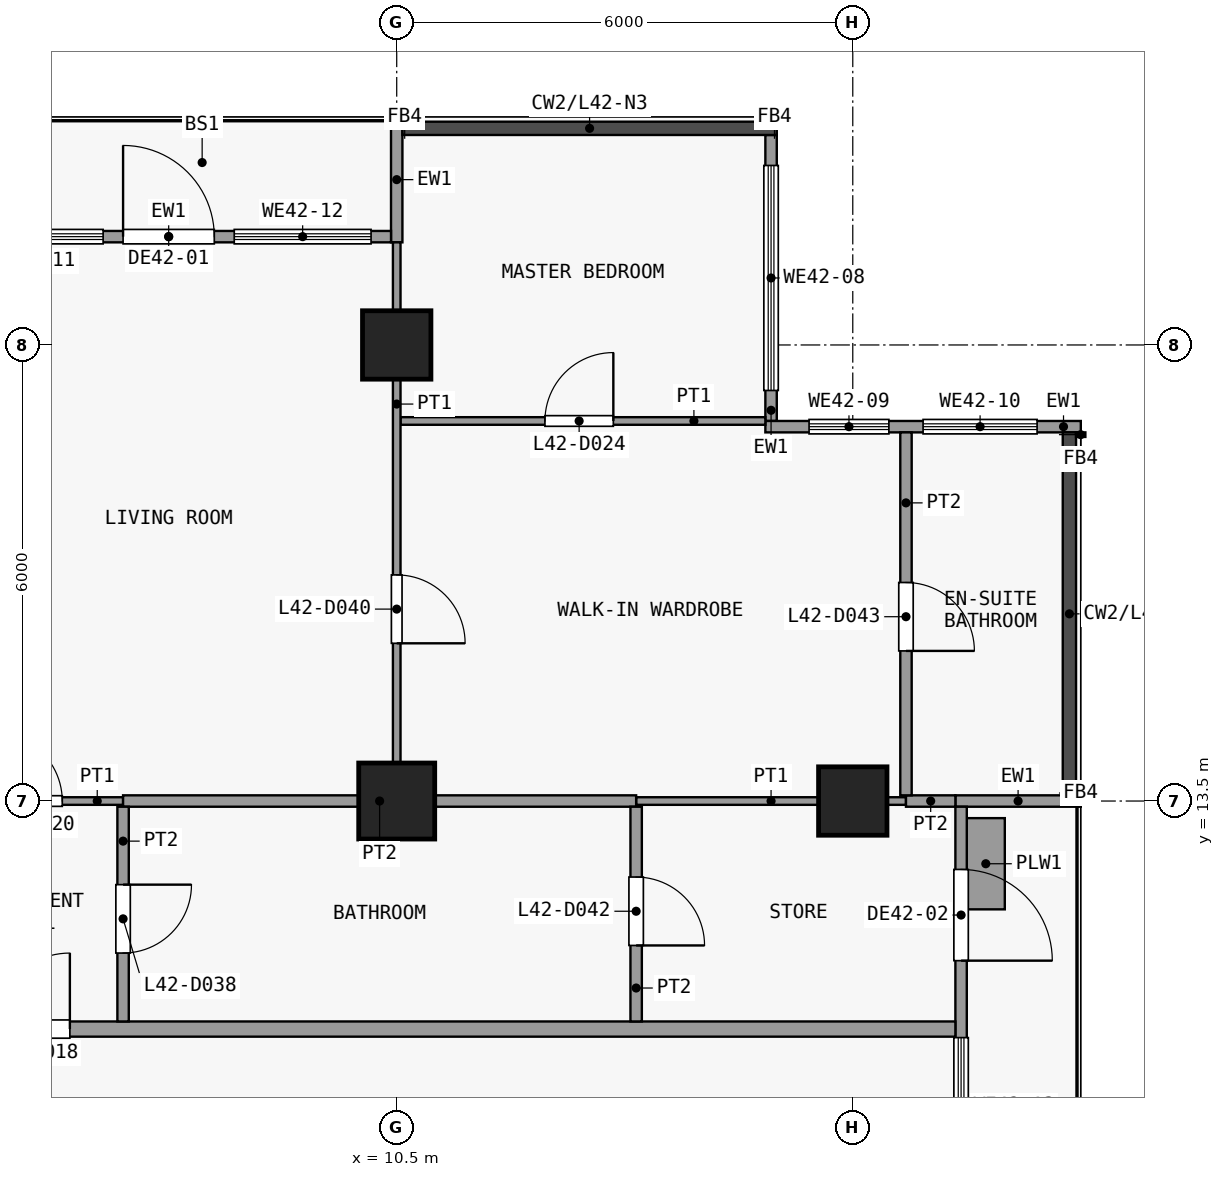
"""IFC4 building model, lengths in metres.
Left out: names, types, materials, properties, quantities, classifications, styles, units other than length and angle.
Written with IfcOpenShell. Run it as: python <this file> out.ifc"""

import sys

from ifc_helpers import new_model, si_unit, direction, frame, frame_2d, origin, origin_2d, place, context, subcontext, project, spatial, rectangle, extrude, element, fill, save


model = new_model("IFC4")
c1 = context("Model", 3, precision=1e-05, world=origin(), true_north=direction((0.0, 1.0)))
c2 = subcontext(c1, "Body", "Model", "MODEL_VIEW")
j1 = project(units=[si_unit("LENGTHUNIT", "METRE"), si_unit("PLANEANGLEUNIT", "RADIAN")], contexts=[c1])
p1 = place(None, origin())
s1 = spatial("IfcSite", under=j1, at=p1, CompositionType="ELEMENT")
p2 = place(p1, origin())
s2 = spatial("IfcBuilding", under=s1, at=p2, CompositionType="ELEMENT")
p3 = place(p2, frame((0.0, 0.0, 170.9)))
s3 = spatial("IfcBuildingStorey", under=s2, at=p3, CompositionType="ELEMENT", Elevation=170.9)
p4 = place(p3, frame((10.5, 13.5, 0.0), z_axis=(0.0, 0.0, 1.0), x_axis=(1.0, 0.0, 0.0)))
e1 = element("IfcColumn", 1, at=p4, inside=s3, PredefinedType="COLUMN", context=c2, shape_type="SweptSolid", body=[
    extrude(rectangle(XDim=1.0, YDim=1.0, at=origin_2d()), origin(), (0.0, 0.0, 1.0), 3.6),
])
for number, where, z_axis, x_axis in (
    (2, (10.5, 19.5, 0.0), (0.0, 0.0, 1.0), (1.0, 0.0, 0.0)),
    (3, (16.5, 13.5, 0.0), (0.0, 0.0, 1.0), (1.0, 0.0, 0.0)),
):
    element("IfcColumn", number, at=place(p3, frame(where, z_axis=z_axis, x_axis=x_axis)), inside=s3, PredefinedType="COLUMN", context=c2, shape_type="SweptSolid", body=[
        extrude(rectangle(XDim=0.9, YDim=0.9, at=origin_2d()), origin(), (0.0, 0.0, 1.0), 3.6),
    ])
p5 = place(p3, frame((15.425, 22.262, 0.0), z_axis=(0.0, 0.0, 1.0), x_axis=(0.0, -1.0, 0.0)))
e4 = element("IfcWall", 4, at=p5, inside=s3, PredefinedType="SOLIDWALL", context=c2, shape_type="SweptSolid", body=[
    extrude(rectangle(XDim=3.762, YDim=0.15, at=frame_2d((1.881, 0.0))), origin(), (0.0, 0.0, 1.0), 3.3),
])
p6 = place(p5, frame((0.401, 0.0, 0.9)))
e5 = element("IfcOpeningElement", 5, at=p6, cuts=e4, PredefinedType="OPENING", context=c2, shape_type="SweptSolid", body=[
    extrude(rectangle(XDim=2.96, YDim=2.4, at=frame_2d((1.48, 1.2))), frame((0.0, 0.085, 0.0), z_axis=(0.0, -1.0, 0.0), x_axis=(1.0, 0.0, 0.0)), (0.0, 0.0, 1.0), 0.17),
])
p7 = place(p3, frame((15.35, 18.425, 0.0), z_axis=(0.0, 0.0, 1.0), x_axis=(1.0, 0.0, 0.0)))
e6 = element("IfcWall", 6, at=p7, inside=s3, PredefinedType="SOLIDWALL", context=c2, shape_type="SweptSolid", body=[
    extrude(rectangle(XDim=4.15, YDim=0.15, at=frame_2d((2.075, 0.0))), origin(), (0.0, 0.0, 1.0), 3.3),
])
p8 = place(p7, frame((0.575, 0.0, 0.9)))
e7 = element("IfcOpeningElement", 7, at=p8, cuts=e6, PredefinedType="OPENING", context=c2, shape_type="SweptSolid", body=[
    extrude(rectangle(XDim=1.05, YDim=2.4, at=frame_2d((0.525, 1.2))), frame((0.0, 0.085, 0.0), z_axis=(0.0, -1.0, 0.0), x_axis=(1.0, 0.0, 0.0)), (0.0, 0.0, 1.0), 0.17),
])
p9 = place(p7, frame((2.075, 0.0, 0.9)))
e8 = element("IfcOpeningElement", 8, at=p9, cuts=e6, PredefinedType="OPENING", context=c2, shape_type="SweptSolid", body=[
    extrude(rectangle(XDim=1.5, YDim=2.4, at=frame_2d((0.75, 1.2))), frame((0.0, 0.085, 0.0), z_axis=(0.0, -1.0, 0.0), x_axis=(1.0, 0.0, 0.0)), (0.0, 0.0, 1.0), 0.17),
])
p10 = place(p3, frame((10.5, 20.85, 0.0), z_axis=(0.0, 0.0, 1.0), x_axis=(0.0, 1.0, 0.0)))
e9 = element("IfcWall", 9, at=p10, inside=s3, PredefinedType="SOLIDWALL", context=c2, shape_type="SweptSolid", body=[
    extrude(rectangle(XDim=1.65, YDim=0.15, at=frame_2d((0.825, 0.0))), origin(), (0.0, 0.0, 1.0), 3.3),
])
p11 = place(p3, frame((4.575, 20.925, 0.0), z_axis=(0.0, 0.0, 1.0), x_axis=(1.0, 0.0, 0.0)))
e10 = element("IfcWall", 10, at=p11, inside=s3, PredefinedType="SOLIDWALL", context=c2, shape_type="SweptSolid", body=[
    extrude(rectangle(XDim=5.85, YDim=0.15, at=frame_2d((2.925, 0.0))), origin(), (0.0, 0.0, 1.0), 3.3),
])
p12 = place(p11, frame((2.325, 0.0, 0.0)))
e11 = element("IfcOpeningElement", 11, at=p12, cuts=e10, PredefinedType="OPENING", context=c2, shape_type="SweptSolid", body=[
    extrude(rectangle(XDim=1.2, YDim=2.4, at=frame_2d((0.6, 1.2))), frame((0.0, 0.085, 0.0), z_axis=(0.0, -1.0, 0.0), x_axis=(1.0, 0.0, 0.0)), (0.0, 0.0, 1.0), 0.17),
])
p13 = place(p11, frame((0.262, 0.0, 0.9)))
e12 = element("IfcOpeningElement", 12, at=p13, cuts=e10, PredefinedType="OPENING", context=c2, shape_type="SweptSolid", body=[
    extrude(rectangle(XDim=1.8, YDim=2.1, at=frame_2d((0.9, 1.05))), frame((0.0, 0.085, 0.0), z_axis=(0.0, -1.0, 0.0), x_axis=(1.0, 0.0, 0.0)), (0.0, 0.0, 1.0), 0.17),
])
p14 = place(p11, frame((3.788, 0.0, 0.9)))
e13 = element("IfcOpeningElement", 13, at=p14, cuts=e10, PredefinedType="OPENING", context=c2, shape_type="SweptSolid", body=[
    extrude(rectangle(XDim=1.8, YDim=2.1, at=frame_2d((0.9, 1.05))), frame((0.0, 0.085, 0.0), z_axis=(0.0, -1.0, 0.0), x_axis=(1.0, 0.0, 0.0)), (0.0, 0.0, 1.0), 0.17),
])
p15 = place(p3, frame((17.85, 13.5, 0.0), z_axis=(0.0, 0.0, 1.0), x_axis=(1.0, 0.0, 0.0)))
e14 = element("IfcWall", 14, at=p15, inside=s3, PredefinedType="SOLIDWALL", context=c2, shape_type="SweptSolid", body=[
    extrude(rectangle(XDim=1.65, YDim=0.15, at=frame_2d((0.825, 0.0))), origin(), (0.0, 0.0, 1.0), 3.3),
])
p16 = place(p3, frame((17.925, 13.425, 0.0), z_axis=(0.0, 0.0, 1.0), x_axis=(0.0, -1.0, 0.0)))
e15 = element("IfcWall", 15, at=p16, inside=s3, PredefinedType="SOLIDWALL", context=c2, shape_type="SweptSolid", body=[
    extrude(rectangle(XDim=5.85, YDim=0.15, at=frame_2d((2.925, 0.0))), origin(), (0.0, 0.0, 1.0), 3.3),
])
p17 = place(p16, frame((0.825, 0.0, 0.0)))
e16 = element("IfcOpeningElement", 16, at=p17, cuts=e15, PredefinedType="OPENING", context=c2, shape_type="SweptSolid", body=[
    extrude(rectangle(XDim=1.2, YDim=2.4, at=frame_2d((0.6, 1.2))), frame((0.0, 0.085, 0.0), z_axis=(0.0, -1.0, 0.0), x_axis=(1.0, 0.0, 0.0)), (0.0, 0.0, 1.0), 0.17),
])
p18 = place(p16, frame((3.038, 0.0, 0.9)))
e17 = element("IfcOpeningElement", 17, at=p18, cuts=e15, PredefinedType="OPENING", context=c2, shape_type="SweptSolid", body=[
    extrude(rectangle(XDim=1.8, YDim=2.1, at=frame_2d((0.9, 1.05))), frame((0.0, 0.085, 0.0), z_axis=(0.0, -1.0, 0.0), x_axis=(1.0, 0.0, 0.0)), (0.0, 0.0, 1.0), 0.17),
])
p19 = place(p3, frame((18.25, 12.075, 0.0), z_axis=(0.0, 0.0, 1.0), x_axis=(0.0, 1.0, 0.0)))
e18 = element("IfcWall", 18, at=p19, inside=s3, PredefinedType="USERDEFINED", context=c2, shape_type="SweptSolid", body=[
    extrude(rectangle(XDim=1.2, YDim=0.5, at=frame_2d((0.6, 0.0))), origin(), (0.0, 0.0, 1.0), 0.9),
])
p20 = place(p3, frame((-19.35, 10.5, 0.0), z_axis=(0.0, 0.0, 1.0), x_axis=(1.0, 0.0, 0.0)))
e19 = element("IfcWall", 19, at=p20, inside=s3, PredefinedType="PARTITIONING", context=c2, shape_type="SweptSolid", body=[
    extrude(rectangle(XDim=37.2, YDim=0.2, at=frame_2d((18.6, 0.0))), origin(), (0.0, 0.0, 1.0), 3.3),
])
p21 = place(p20, frame((10.55, 0.0, 0.0)))
e20 = element("IfcOpeningElement", 20, at=p21, cuts=e19, PredefinedType="OPENING", context=c2, shape_type="SweptSolid", body=[
    extrude(rectangle(XDim=1.0, YDim=2.1, at=frame_2d((0.5, 1.05))), frame((0.0, 0.11, 0.0), z_axis=(0.0, -1.0, 0.0), x_axis=(1.0, 0.0, 0.0)), (0.0, 0.0, 1.0), 0.22),
])
p22 = place(p20, frame((24.55, 0.0, 0.0)))
e21 = element("IfcOpeningElement", 21, at=p22, cuts=e19, PredefinedType="OPENING", context=c2, shape_type="SweptSolid", body=[
    extrude(rectangle(XDim=1.0, YDim=2.1, at=frame_2d((0.5, 1.05))), frame((0.0, 0.11, 0.0), z_axis=(0.0, -1.0, 0.0), x_axis=(1.0, 0.0, 0.0)), (0.0, 0.0, 1.0), 0.22),
])
p23 = place(p3, frame((4.5, 13.5, 0.0), z_axis=(0.0, 0.0, 1.0), x_axis=(1.0, 0.0, 0.0)))
e22 = element("IfcWall", 22, at=p23, inside=s3, PredefinedType="PARTITIONING", context=c2, shape_type="SweptSolid", body=[
    extrude(rectangle(XDim=2.4, YDim=0.1, at=frame_2d((1.2, 0.0))), origin(), (0.0, 0.0, 1.0), 3.3),
])
p24 = place(p23, frame((0.7, 0.0, 0.0)))
e23 = element("IfcOpeningElement", 23, at=p24, cuts=e22, PredefinedType="OPENING", context=c2, shape_type="SweptSolid", body=[
    extrude(rectangle(XDim=0.9, YDim=2.1, at=frame_2d((0.45, 1.05))), frame((0.0, 0.06, 0.0), z_axis=(0.0, -1.0, 0.0), x_axis=(1.0, 0.0, 0.0)), (0.0, 0.0, 1.0), 0.12),
])
p25 = place(p3, frame((13.65, 13.5, 0.0), z_axis=(0.0, 0.0, 1.0), x_axis=(1.0, 0.0, 0.0)))
e24 = element("IfcWall", 24, at=p25, inside=s3, PredefinedType="PARTITIONING", context=c2, shape_type="SweptSolid", body=[
    extrude(rectangle(XDim=3.55, YDim=0.1, at=frame_2d((1.775, 0.0))), origin(), (0.0, 0.0, 1.0), 3.3),
])
p26 = place(p3, frame((6.9, 13.5, 0.0), z_axis=(0.0, 0.0, 1.0), x_axis=(1.0, 0.0, 0.0)))
e25 = element("IfcWall", 25, at=p26, inside=s3, PredefinedType="PARTITIONING", context=c2, shape_type="SweptSolid", body=[
    extrude(rectangle(XDim=6.75, YDim=0.15, at=frame_2d((3.375, 0.0))), origin(), (0.0, 0.0, 1.0), 3.3),
])
p27 = place(p3, frame((17.2, 13.5, 0.0), z_axis=(0.0, 0.0, 1.0), x_axis=(1.0, 0.0, 0.0)))
e26 = element("IfcWall", 26, at=p27, inside=s3, PredefinedType="PARTITIONING", context=c2, shape_type="SweptSolid", body=[
    extrude(rectangle(XDim=0.65, YDim=0.15, at=frame_2d((0.325, 0.0))), origin(), (0.0, 0.0, 1.0), 3.3),
])
p28 = place(p3, frame((10.55, 18.5, 0.0), z_axis=(0.0, 0.0, 1.0), x_axis=(1.0, 0.0, 0.0)))
e27 = element("IfcWall", 27, at=p28, inside=s3, PredefinedType="PARTITIONING", context=c2, shape_type="SweptSolid", body=[
    extrude(rectangle(XDim=4.8, YDim=0.1, at=frame_2d((2.4, 0.0))), origin(), (0.0, 0.0, 1.0), 3.3),
])
p29 = place(p28, frame((1.9, 0.0, 0.0)))
e28 = element("IfcOpeningElement", 28, at=p29, cuts=e27, PredefinedType="OPENING", context=c2, shape_type="SweptSolid", body=[
    extrude(rectangle(XDim=0.9, YDim=2.1, at=frame_2d((0.45, 1.05))), frame((0.0, 0.06, 0.0), z_axis=(0.0, -1.0, 0.0), x_axis=(1.0, 0.0, 0.0)), (0.0, 0.0, 1.0), 0.12),
])
p30 = place(p3, frame((6.9, 10.6, 0.0), z_axis=(0.0, 0.0, 1.0), x_axis=(0.0, 1.0, 0.0)))
e29 = element("IfcWall", 29, at=p30, inside=s3, PredefinedType="PARTITIONING", context=c2, shape_type="SweptSolid", body=[
    extrude(rectangle(XDim=2.825, YDim=0.15, at=frame_2d((1.413, 0.0))), origin(), (0.0, 0.0, 1.0), 3.3),
])
p31 = place(p30, frame((0.9, 0.0, 0.0)))
e30 = element("IfcOpeningElement", 30, at=p31, cuts=e29, PredefinedType="OPENING", context=c2, shape_type="SweptSolid", body=[
    extrude(rectangle(XDim=0.9, YDim=2.1, at=frame_2d((0.45, 1.05))), frame((0.0, 0.085, 0.0), z_axis=(0.0, -1.0, 0.0), x_axis=(1.0, 0.0, 0.0)), (0.0, 0.0, 1.0), 0.17),
])
p32 = place(p3, frame((10.5, 13.575, 0.0), z_axis=(0.0, 0.0, 1.0), x_axis=(0.0, 1.0, 0.0)))
e31 = element("IfcWall", 31, at=p32, inside=s3, PredefinedType="PARTITIONING", context=c2, shape_type="SweptSolid", body=[
    extrude(rectangle(XDim=7.275, YDim=0.1, at=frame_2d((3.638, 0.0))), origin(), (0.0, 0.0, 1.0), 3.3),
])
p33 = place(p32, frame((2.0, 0.0, 0.0)))
e32 = element("IfcOpeningElement", 32, at=p33, cuts=e31, PredefinedType="OPENING", context=c2, shape_type="SweptSolid", body=[
    extrude(rectangle(XDim=0.9, YDim=2.1, at=frame_2d((0.45, 1.05))), frame((0.0, 0.06, 0.0), z_axis=(0.0, -1.0, 0.0), x_axis=(1.0, 0.0, 0.0)), (0.0, 0.0, 1.0), 0.12),
])
p34 = place(p3, frame((13.65, 10.6, 0.0), z_axis=(0.0, 0.0, 1.0), x_axis=(0.0, 1.0, 0.0)))
e33 = element("IfcWall", 33, at=p34, inside=s3, PredefinedType="PARTITIONING", context=c2, shape_type="SweptSolid", body=[
    extrude(rectangle(XDim=2.825, YDim=0.15, at=frame_2d((1.413, 0.0))), origin(), (0.0, 0.0, 1.0), 3.3),
])
p35 = place(p34, frame((1.0, 0.0, 0.0)))
e34 = element("IfcOpeningElement", 34, at=p35, cuts=e33, PredefinedType="OPENING", context=c2, shape_type="SweptSolid", body=[
    extrude(rectangle(XDim=0.9, YDim=2.1, at=frame_2d((0.45, 1.05))), frame((0.0, 0.085, 0.0), z_axis=(0.0, -1.0, 0.0), x_axis=(1.0, 0.0, 0.0)), (0.0, 0.0, 1.0), 0.17),
])
p36 = place(p3, frame((17.2, 13.575, 0.0), z_axis=(0.0, 0.0, 1.0), x_axis=(0.0, 1.0, 0.0)))
e35 = element("IfcWall", 35, at=p36, inside=s3, PredefinedType="PARTITIONING", context=c2, shape_type="SweptSolid", body=[
    extrude(rectangle(XDim=4.775, YDim=0.15, at=frame_2d((2.388, 0.0))), origin(), (0.0, 0.0, 1.0), 3.3),
])
p37 = place(p36, frame((1.9, 0.0, 0.0)))
e36 = element("IfcOpeningElement", 36, at=p37, cuts=e35, PredefinedType="OPENING", context=c2, shape_type="SweptSolid", body=[
    extrude(rectangle(XDim=0.9, YDim=2.1, at=frame_2d((0.45, 1.05))), frame((0.0, 0.085, 0.0), z_axis=(0.0, -1.0, 0.0), x_axis=(1.0, 0.0, 0.0)), (0.0, 0.0, 1.0), 0.17),
])
p38 = place(p6, origin())
e37 = element("IfcWindow", 37, at=p38, inside=s3, PartitioningType="SINGLE_PANEL", PredefinedType="WINDOW", context=c2, shape_type="SweptSolid", body=[
    extrude(rectangle(XDim=2.96, YDim=2.4, at=frame_2d((1.48, 1.2))), frame((0.0, 0.03, 0.0), z_axis=(0.0, -1.0, 0.0), x_axis=(1.0, 0.0, 0.0)), (0.0, 0.0, 1.0), 0.06),
])
fill(e5, e37)
p39 = place(p8, origin())
e38 = element("IfcWindow", 38, at=p39, inside=s3, PartitioningType="SINGLE_PANEL", PredefinedType="WINDOW", context=c2, shape_type="SweptSolid", body=[
    extrude(rectangle(XDim=1.05, YDim=2.4, at=frame_2d((0.525, 1.2))), frame((0.0, 0.03, 0.0), z_axis=(0.0, -1.0, 0.0), x_axis=(1.0, 0.0, 0.0)), (0.0, 0.0, 1.0), 0.06),
])
fill(e7, e38)
p40 = place(p9, origin())
e39 = element("IfcWindow", 39, at=p40, inside=s3, PartitioningType="SINGLE_PANEL", PredefinedType="WINDOW", context=c2, shape_type="SweptSolid", body=[
    extrude(rectangle(XDim=1.5, YDim=2.4, at=frame_2d((0.75, 1.2))), frame((0.0, 0.03, 0.0), z_axis=(0.0, -1.0, 0.0), x_axis=(1.0, 0.0, 0.0)), (0.0, 0.0, 1.0), 0.06),
])
fill(e8, e39)
p41 = place(p12, origin())
e40 = element("IfcDoor", 40, at=p41, inside=s3, OperationType="SINGLE_SWING_LEFT", PredefinedType="DOOR", context=c2, shape_type="SweptSolid", body=[
    extrude(rectangle(XDim=1.2, YDim=2.4, at=frame_2d((0.6, 1.2))), frame((0.0, 0.025, 0.0), z_axis=(0.0, -1.0, 0.0), x_axis=(1.0, 0.0, 0.0)), (0.0, 0.0, 1.0), 0.05),
])
fill(e11, e40)
p42 = place(p13, origin())
e41 = element("IfcWindow", 41, at=p42, inside=s3, PartitioningType="SINGLE_PANEL", PredefinedType="WINDOW", context=c2, shape_type="SweptSolid", body=[
    extrude(rectangle(XDim=1.8, YDim=2.1, at=frame_2d((0.9, 1.05))), frame((0.0, 0.03, 0.0), z_axis=(0.0, -1.0, 0.0), x_axis=(1.0, 0.0, 0.0)), (0.0, 0.0, 1.0), 0.06),
])
fill(e12, e41)
p43 = place(p14, origin())
e42 = element("IfcWindow", 42, at=p43, inside=s3, PartitioningType="SINGLE_PANEL", PredefinedType="WINDOW", context=c2, shape_type="SweptSolid", body=[
    extrude(rectangle(XDim=1.8, YDim=2.1, at=frame_2d((0.9, 1.05))), frame((0.0, 0.03, 0.0), z_axis=(0.0, -1.0, 0.0), x_axis=(1.0, 0.0, 0.0)), (0.0, 0.0, 1.0), 0.06),
])
fill(e13, e42)
p44 = place(p17, origin())
e43 = element("IfcDoor", 43, at=p44, inside=s3, OperationType="SINGLE_SWING_RIGHT", PredefinedType="DOOR", context=c2, shape_type="SweptSolid", body=[
    extrude(rectangle(XDim=1.2, YDim=2.4, at=frame_2d((0.6, 1.2))), frame((0.0, 0.025, 0.0), z_axis=(0.0, -1.0, 0.0), x_axis=(1.0, 0.0, 0.0)), (0.0, 0.0, 1.0), 0.05),
])
fill(e16, e43)
p45 = place(p18, origin())
e44 = element("IfcWindow", 44, at=p45, inside=s3, PartitioningType="SINGLE_PANEL", PredefinedType="WINDOW", context=c2, shape_type="SweptSolid", body=[
    extrude(rectangle(XDim=1.8, YDim=2.1, at=frame_2d((0.9, 1.05))), frame((0.0, 0.03, 0.0), z_axis=(0.0, -1.0, 0.0), x_axis=(1.0, 0.0, 0.0)), (0.0, 0.0, 1.0), 0.06),
])
fill(e17, e44)
p46 = place(p22, origin())
e45 = element("IfcDoor", 45, at=p46, inside=s3, OperationType="SINGLE_SWING_LEFT", PredefinedType="DOOR", context=c2, shape_type="SweptSolid", body=[
    extrude(rectangle(XDim=1.0, YDim=2.1, at=frame_2d((0.5, 1.05))), frame((0.0, 0.025, 0.0), z_axis=(0.0, -1.0, 0.0), x_axis=(1.0, 0.0, 0.0)), (0.0, 0.0, 1.0), 0.05),
])
fill(e21, e45)
p47 = place(p24, origin())
e46 = element("IfcDoor", 46, at=p47, inside=s3, OperationType="SINGLE_SWING_RIGHT", PredefinedType="DOOR", context=c2, shape_type="SweptSolid", body=[
    extrude(rectangle(XDim=0.9, YDim=2.1, at=frame_2d((0.45, 1.05))), frame((0.0, 0.025, 0.0), z_axis=(0.0, -1.0, 0.0), x_axis=(1.0, 0.0, 0.0)), (0.0, 0.0, 1.0), 0.05),
])
fill(e23, e46)
p48 = place(p29, origin())
e47 = element("IfcDoor", 47, at=p48, inside=s3, OperationType="SINGLE_SWING_LEFT", PredefinedType="DOOR", context=c2, shape_type="SweptSolid", body=[
    extrude(rectangle(XDim=0.9, YDim=2.1, at=frame_2d((0.45, 1.05))), frame((0.0, 0.025, 0.0), z_axis=(0.0, -1.0, 0.0), x_axis=(1.0, 0.0, 0.0)), (0.0, 0.0, 1.0), 0.05),
])
fill(e28, e47)
p49 = place(p31, origin())
e48 = element("IfcDoor", 48, at=p49, inside=s3, OperationType="SINGLE_SWING_RIGHT", PredefinedType="DOOR", context=c2, shape_type="SweptSolid", body=[
    extrude(rectangle(XDim=0.9, YDim=2.1, at=frame_2d((0.45, 1.05))), frame((0.0, 0.025, 0.0), z_axis=(0.0, -1.0, 0.0), x_axis=(1.0, 0.0, 0.0)), (0.0, 0.0, 1.0), 0.05),
])
fill(e30, e48)
p50 = place(p33, origin())
e49 = element("IfcDoor", 49, at=p50, inside=s3, OperationType="SINGLE_SWING_LEFT", PredefinedType="DOOR", context=c2, shape_type="SweptSolid", body=[
    extrude(rectangle(XDim=0.9, YDim=2.1, at=frame_2d((0.45, 1.05))), frame((0.0, 0.025, 0.0), z_axis=(0.0, -1.0, 0.0), x_axis=(1.0, 0.0, 0.0)), (0.0, 0.0, 1.0), 0.05),
])
fill(e32, e49)
p51 = place(p35, origin())
e50 = element("IfcDoor", 50, at=p51, inside=s3, OperationType="SINGLE_SWING_LEFT", PredefinedType="DOOR", context=c2, shape_type="SweptSolid", body=[
    extrude(rectangle(XDim=0.9, YDim=2.1, at=frame_2d((0.45, 1.05))), frame((0.0, 0.025, 0.0), z_axis=(0.0, -1.0, 0.0), x_axis=(1.0, 0.0, 0.0)), (0.0, 0.0, 1.0), 0.05),
])
fill(e34, e50)
p52 = place(p37, origin())
e51 = element("IfcDoor", 51, at=p52, inside=s3, OperationType="SINGLE_SWING_LEFT", PredefinedType="DOOR", context=c2, shape_type="SweptSolid", body=[
    extrude(rectangle(XDim=0.9, YDim=2.1, at=frame_2d((0.45, 1.05))), frame((0.0, 0.025, 0.0), z_axis=(0.0, -1.0, 0.0), x_axis=(1.0, 0.0, 0.0)), (0.0, 0.0, 1.0), 0.05),
])
fill(e36, e51)
save(model, sys.argv[1])
